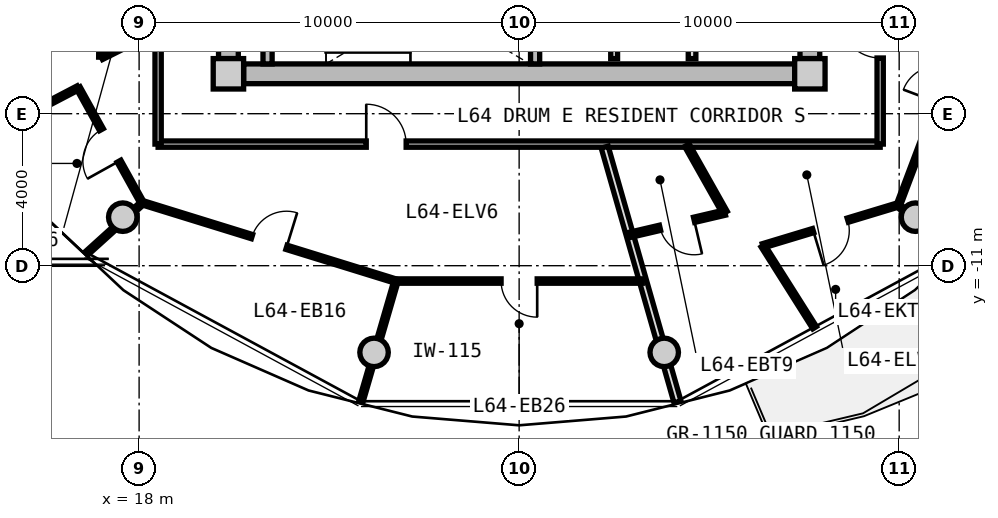
"""IFC4 building model, lengths in metres.
Left out: names, types, materials, properties, quantities, classifications, styles, units other than length and angle.
Written with IfcOpenShell. Run it as: python <this file> out.ifc"""

import sys

from ifc_helpers import new_model, si_unit, direction, frame, frame_2d, origin, origin_2d, place, context, subcontext, project, spatial, rectangle, circle, extrude, source, transform, mapped, element, fill, save


model = new_model("IFC4")
c1 = context("Model", 3, precision=1e-05, world=origin(), true_north=direction((0.0, 1.0)))
c2 = subcontext(c1, "Body", "Model", "MODEL_VIEW")
j1 = project(units=[si_unit("LENGTHUNIT", "METRE"), si_unit("PLANEANGLEUNIT", "RADIAN")], contexts=[c1])
p1 = place(None, origin())
s1 = spatial("IfcSite", under=j1, at=p1, CompositionType="ELEMENT")
p2 = place(p1, origin())
s2 = spatial("IfcBuilding", under=s1, at=p2, CompositionType="ELEMENT")
p3 = place(p2, frame((0.0, 0.0, 207.8)))
s3 = spatial("IfcBuildingStorey", under=s2, at=p3, CompositionType="ELEMENT", Elevation=207.8)
m1 = source(origin(), c2, "Body", "SweptSolid", [
    extrude(rectangle(XDim=0.8, YDim=0.8, at=origin_2d()), origin(), (0.0, 0.0, 1.0), 3.05),
])
for number, where, z_axis, x_axis in (
    (1, (20.35, -5.95, 0.0), (0.0, 0.0, 1.0), (1.0, 0.0, 0.0)),
    (2, (35.65, -5.95, 0.0), (0.0, 0.0, 1.0), (1.0, 0.0, 0.0)),
):
    element("IfcColumn", number, at=place(p3, frame(where, z_axis=z_axis, x_axis=x_axis)), inside=s3, PredefinedType="COLUMN", context=c2, shape_type="MappedRepresentation", body=[
        mapped(m1, transform((0.0, 0.0, 0.0), x_axis=(1.0, 0.0, 0.0), y_axis=(0.0, 1.0, 0.0), z_axis=(0.0, 0.0, 1.0), scale=1.0)),
    ])
m2 = source(origin(), c2, "Body", "SweptSolid", [
    extrude(rectangle(XDim=14.5, YDim=0.52, at=frame_2d((7.25, 0.0))), origin(), (0.0, 0.0, 1.0), 2.76),
])
p4 = place(p3, frame((35.25, -5.95, 0.0), z_axis=(0.0, 0.0, 1.0), x_axis=(-1.0, 0.0, 0.0)))
e3 = element("IfcWall", 3, at=p4, inside=s3, PredefinedType="SHEAR", context=c2, shape_type="MappedRepresentation", body=[
    mapped(m2, transform((0.0, 0.0, 0.0), x_axis=(1.0, 0.0, 0.0), y_axis=(0.0, 1.0, 0.0), z_axis=(0.0, 0.0, 1.0), scale=1.0)),
])
m3 = source(origin(), c2, "Body", "SweptSolid", [
    extrude(rectangle(XDim=11.1, YDim=0.52, at=frame_2d((5.55, 0.0))), origin(), (0.0, 0.0, 1.0), 2.76),
])
p5 = place(p3, frame((20.35, -5.55, 0.0), z_axis=(0.0, 0.0, 1.0), x_axis=(0.0, 1.0, 0.0)))
e4 = element("IfcWall", 4, at=p5, inside=s3, PredefinedType="SHEAR", context=c2, shape_type="MappedRepresentation", body=[
    mapped(m3, transform((0.0, 0.0, 0.0), x_axis=(1.0, 0.0, 0.0), y_axis=(0.0, 1.0, 0.0), z_axis=(0.0, 0.0, 1.0), scale=1.0)),
])
p6 = place(p5, frame((3.8, 0.0, 0.0)))
e5 = element("IfcOpeningElement", 5, at=p6, cuts=e4, PredefinedType="OPENING", context=c2, shape_type="SweptSolid", body=[
    extrude(rectangle(XDim=1.2, YDim=2.15, at=frame_2d((0.6, 1.075))), frame((0.0, 0.27, 0.0), z_axis=(0.0, -1.0, 0.0), x_axis=(1.0, 0.0, 0.0)), (0.0, 0.0, 1.0), 0.54),
])
p7 = place(p3, frame((35.65, 5.55, 0.0), z_axis=(0.0, 0.0, 1.0), x_axis=(0.0, -1.0, 0.0)))
e6 = element("IfcWall", 6, at=p7, inside=s3, PredefinedType="SHEAR", context=c2, shape_type="MappedRepresentation", body=[
    mapped(m3, transform((0.0, 0.0, 0.0), x_axis=(1.0, 0.0, 0.0), y_axis=(0.0, 1.0, 0.0), z_axis=(0.0, 0.0, 1.0), scale=1.0)),
])
p8 = place(p7, frame((5.65, 0.0, 0.0)))
e7 = element("IfcOpeningElement", 7, at=p8, cuts=e6, PredefinedType="OPENING", context=c2, shape_type="SweptSolid", body=[
    extrude(rectangle(XDim=1.2, YDim=2.15, at=frame_2d((0.6, 1.075))), frame((0.0, 0.27, 0.0), z_axis=(0.0, -1.0, 0.0), x_axis=(1.0, 0.0, 0.0)), (0.0, 0.0, 1.0), 0.54),
])
p9 = place(p7, frame((9.3, 0.0, 0.0)))
e8 = element("IfcOpeningElement", 8, at=p9, cuts=e6, PredefinedType="OPENING", context=c2, shape_type="SweptSolid", body=[
    extrude(rectangle(XDim=1.0, YDim=2.1, at=frame_2d((0.5, 1.05))), frame((0.0, 0.27, 0.0), z_axis=(0.0, -1.0, 0.0), x_axis=(1.0, 0.0, 0.0)), (0.0, 0.0, 1.0), 0.54),
])
m4 = source(origin(), c2, "Body", "SweptSolid", [
    extrude(circle(Radius=0.375, at=origin_2d()), origin(), (0.0, 0.0, 1.0), 3.05),
])
for number, where, z_axis, x_axis in (
    (9, (17.57, -9.723, 0.0), (0.0, 0.0, 1.0), (1.0, 0.0, 0.0)),
    (10, (24.182, -13.281, 0.0), (0.0, 0.0, 1.0), (1.0, 0.0, 0.0)),
    (11, (31.818, -13.281, 0.0), (0.0, 0.0, 1.0), (1.0, 0.0, 0.0)),
    (12, (38.43, -9.723, 0.0), (0.0, 0.0, 1.0), (1.0, 0.0, 0.0)),
):
    element("IfcColumn", number, at=place(p3, frame(where, z_axis=z_axis, x_axis=x_axis)), inside=s3, PredefinedType="COLUMN", context=c2, shape_type="MappedRepresentation", body=[
        mapped(m4, transform((0.0, 0.0, 0.0), x_axis=(1.0, 0.0, 0.0), y_axis=(0.0, 1.0, 0.0), z_axis=(0.0, 0.0, 1.0), scale=1.0)),
    ])
m5 = source(origin(), c2, "Body", "SweptSolid", [
    extrude(rectangle(XDim=3.24, YDim=0.24, at=frame_2d((1.62, 0.0))), origin(), (0.0, 0.0, 1.0), 2.76),
])
for number, where, z_axis, x_axis in (
    (13, (21.38, -5.69, 0.0), (0.0, 0.0, 1.0), (0.0, 1.0, 0.0)),
    (14, (28.42, -5.69, 0.0), (0.0, 0.0, 1.0), (0.0, 1.0, 0.0)),
):
    element("IfcWall", number, at=place(p3, frame(where, z_axis=z_axis, x_axis=x_axis)), inside=s3, PredefinedType="PARTITIONING", context=c2, shape_type="MappedRepresentation", body=[
        mapped(m5, transform((0.0, 0.0, 0.0), x_axis=(1.0, 0.0, 0.0), y_axis=(0.0, 1.0, 0.0), z_axis=(0.0, 0.0, 1.0), scale=1.0)),
    ])
m6 = source(origin(), c2, "Body", "SweptSolid", [
    extrude(rectangle(XDim=3.8, YDim=0.2, at=frame_2d((1.9, 0.0))), origin(), (0.0, 0.0, 1.0), 2.745),
])
p10 = place(p3, frame((32.55, -5.55, 0.0), z_axis=(0.0, 0.0, 1.0), x_axis=(0.0, 1.0, 0.0)))
e15 = element("IfcWall", 15, at=p10, inside=s3, PredefinedType="PARTITIONING", context=c2, shape_type="MappedRepresentation", body=[
    mapped(m6, transform((0.0, 0.0, 0.0), x_axis=(1.0, 0.0, 0.0), y_axis=(0.0, 1.0, 0.0), z_axis=(0.0, 0.0, 1.0), scale=1.0)),
])
m7 = source(origin(), c2, "Body", "SweptSolid", [
    extrude(rectangle(XDim=4.2, YDim=0.18, at=frame_2d((2.1, 0.0))), origin(), (0.0, 0.0, 1.0), 2.745),
])
p11 = place(p3, frame((30.5, -5.55, 0.0), z_axis=(0.0, 0.0, 1.0), x_axis=(0.0, 1.0, 0.0)))
e16 = element("IfcWall", 16, at=p11, inside=s3, PredefinedType="PARTITIONING", context=c2, shape_type="MappedRepresentation", body=[
    mapped(m7, transform((0.0, 0.0, 0.0), x_axis=(1.0, 0.0, 0.0), y_axis=(0.0, 1.0, 0.0), z_axis=(0.0, 0.0, 1.0), scale=1.0)),
])
m8 = source(origin(), c2, "Body", "SweptSolid", [
    extrude(rectangle(XDim=19.0, YDim=0.165, at=frame_2d((9.5, 0.0))), origin(), (0.0, 0.0, 1.0), 2.745),
])
p12 = place(p3, frame((37.5, -7.8, 0.0), z_axis=(0.0, 0.0, 1.0), x_axis=(-1.0, 0.0, 0.0)))
e17 = element("IfcWall", 17, at=p12, inside=s3, PredefinedType="PARTITIONING", context=c2, shape_type="MappedRepresentation", body=[
    mapped(m8, transform((0.0, 0.0, 0.0), x_axis=(1.0, 0.0, 0.0), y_axis=(0.0, 1.0, 0.0), z_axis=(0.0, 0.0, 1.0), scale=1.0)),
])
p13 = place(p12, frame((12.473, 0.0, 0.0)))
e18 = element("IfcOpeningElement", 18, at=p13, cuts=e17, PredefinedType="OPENING", context=c2, shape_type="SweptSolid", body=[
    extrude(rectangle(XDim=1.05, YDim=2.15, at=frame_2d((0.525, 1.075))), frame((0.0, 0.093, 0.0), z_axis=(0.0, -1.0, 0.0), x_axis=(1.0, 0.0, 0.0)), (0.0, 0.0, 1.0), 0.185),
])
m9 = source(origin(), c2, "Body", "SweptSolid", [
    extrude(rectangle(XDim=6.88, YDim=0.165, at=frame_2d((3.44, 0.0))), origin(), (0.0, 0.0, 1.0), 2.745),
])
p14 = place(p3, frame((18.5, -7.8, 0.0), z_axis=(0.0, 0.0, 1.0), x_axis=(0.0, 1.0, 0.0)))
e19 = element("IfcWall", 19, at=p14, inside=s3, PredefinedType="PARTITIONING", context=c2, shape_type="MappedRepresentation", body=[
    mapped(m9, transform((0.0, 0.0, 0.0), x_axis=(1.0, 0.0, 0.0), y_axis=(0.0, 1.0, 0.0), z_axis=(0.0, 0.0, 1.0), scale=1.0)),
])
p15 = place(p3, frame((37.5, -0.92, 0.0), z_axis=(0.0, 0.0, 1.0), x_axis=(0.0, -1.0, 0.0)))
e20 = element("IfcWall", 20, at=p15, inside=s3, PredefinedType="PARTITIONING", context=c2, shape_type="MappedRepresentation", body=[
    mapped(m9, transform((0.0, 0.0, 0.0), x_axis=(1.0, 0.0, 0.0), y_axis=(0.0, 1.0, 0.0), z_axis=(0.0, 0.0, 1.0), scale=1.0)),
])
p16 = place(p15, frame((3.564, 0.0, 0.0)))
e21 = element("IfcOpeningElement", 21, at=p16, cuts=e20, PredefinedType="OPENING", context=c2, shape_type="SweptSolid", body=[
    extrude(rectangle(XDim=1.05, YDim=2.15, at=frame_2d((0.525, 1.075))), frame((0.0, 0.093, 0.0), z_axis=(0.0, -1.0, 0.0), x_axis=(1.0, 0.0, 0.0)), (0.0, 0.0, 1.0), 0.185),
])
m10 = source(origin(), c2, "Body", "SweptSolid", [
    extrude(rectangle(XDim=6.974, YDim=0.19, at=frame_2d((3.487, 0.0))), origin(), (0.0, 0.0, 1.0), 2.345),
])
p17 = place(p3, frame((30.251, -7.88, 0.0), z_axis=(0.0, 0.0, 1.0), x_axis=(0.274707256801, -0.961527910703, 0.0)))
e22 = element("IfcWall", 22, at=p17, inside=s3, PredefinedType="PARTITIONING", context=c2, shape_type="MappedRepresentation", body=[
    mapped(m10, transform((0.0, 0.0, 0.0), x_axis=(1.0, 0.0, 0.0), y_axis=(0.0, 1.0, 0.0), z_axis=(0.0, 0.0, 1.0), scale=1.0)),
])
m11 = source(origin(), c2, "Body", "SweptSolid", [
    extrude(rectangle(XDim=6.98, YDim=0.115, at=frame_2d((3.49, 0.0))), origin(), (0.0, 0.0, 1.0), 2.745),
])
p18 = place(p3, frame((18.091, -9.344, 0.0), z_axis=(0.0, 0.0, 1.0), x_axis=(0.955342331637, -0.295501318749, 0.0)))
e23 = element("IfcWall", 23, at=p18, inside=s3, PredefinedType="PARTITIONING", context=c2, shape_type="MappedRepresentation", body=[
    mapped(m11, transform((0.0, 0.0, 0.0), x_axis=(1.0, 0.0, 0.0), y_axis=(0.0, 1.0, 0.0), z_axis=(0.0, 0.0, 1.0), scale=1.0)),
])
p19 = place(p18, frame((3.015, 0.0, 0.0)))
e24 = element("IfcOpeningElement", 24, at=p19, cuts=e23, PredefinedType="OPENING", context=c2, shape_type="SweptSolid", body=[
    extrude(rectangle(XDim=0.95, YDim=2.1, at=frame_2d((0.475, 1.05))), frame((0.0, 0.067, 0.0), z_axis=(0.0, -1.0, 0.0), x_axis=(1.0, 0.0, 0.0)), (0.0, 0.0, 1.0), 0.135),
])
m12 = source(origin(), c2, "Body", "SweptSolid", [
    extrude(rectangle(XDim=1.988, YDim=0.115, at=frame_2d((0.994, 0.0))), origin(), (0.0, 0.0, 1.0), 2.345),
])
p20 = place(p3, frame((18.091, -9.344, 0.0), z_axis=(0.0, 0.0, 1.0), x_axis=(-0.741992301729, -0.670408401033, 0.0)))
e25 = element("IfcWall", 25, at=p20, inside=s3, PredefinedType="PARTITIONING", context=c2, shape_type="MappedRepresentation", body=[
    mapped(m12, transform((0.0, 0.0, 0.0), x_axis=(1.0, 0.0, 0.0), y_axis=(0.0, 1.0, 0.0), z_axis=(0.0, 0.0, 1.0), scale=1.0)),
])
m13 = source(origin(), c2, "Body", "SweptSolid", [
    extrude(rectangle(XDim=6.481, YDim=0.115, at=frame_2d((3.24, 0.0))), origin(), (0.0, 0.0, 1.0), 2.745),
])
p21 = place(p3, frame((24.76, -11.404, 0.0), z_axis=(0.0, 0.0, 1.0), x_axis=(1.0, 0.0, 0.0)))
e26 = element("IfcWall", 26, at=p21, inside=s3, PredefinedType="PARTITIONING", context=c2, shape_type="MappedRepresentation", body=[
    mapped(m13, transform((0.0, 0.0, 0.0), x_axis=(1.0, 0.0, 0.0), y_axis=(0.0, 1.0, 0.0), z_axis=(0.0, 0.0, 1.0), scale=1.0)),
])
p22 = place(p21, frame((2.765, 0.0, 0.0)))
e27 = element("IfcOpeningElement", 27, at=p22, cuts=e26, PredefinedType="OPENING", context=c2, shape_type="SweptSolid", body=[
    extrude(rectangle(XDim=0.95, YDim=2.1, at=frame_2d((0.475, 1.05))), frame((0.0, 0.067, 0.0), z_axis=(0.0, -1.0, 0.0), x_axis=(1.0, 0.0, 0.0)), (0.0, 0.0, 1.0), 0.135),
])
m14 = source(origin(), c2, "Body", "SweptSolid", [
    extrude(rectangle(XDim=3.313, YDim=0.115, at=frame_2d((1.657, 0.0))), origin(), (0.0, 0.0, 1.0), 2.345),
])
p23 = place(p3, frame((24.76, -11.404, 0.0), z_axis=(0.0, 0.0, 1.0), x_axis=(-0.279612365916, -0.960112975033, 0.0)))
e28 = element("IfcWall", 28, at=p23, inside=s3, PredefinedType="PARTITIONING", context=c2, shape_type="MappedRepresentation", body=[
    mapped(m14, transform((0.0, 0.0, 0.0), x_axis=(1.0, 0.0, 0.0), y_axis=(0.0, 1.0, 0.0), z_axis=(0.0, 0.0, 1.0), scale=1.0)),
])
m15 = source(origin(), c2, "Body", "SweptSolid", [
    extrude(rectangle(XDim=1.638, YDim=0.14, at=frame_2d((0.819, 0.0))), origin(), (0.0, 0.0, 1.0), 2.745),
])
p24 = place(p3, frame((18.47, -4.778, 0.0), z_axis=(0.0, 0.0, 1.0), x_axis=(-0.893919977945, -0.448226586707, 0.0)))
e29 = element("IfcWall", 29, at=p24, inside=s3, PredefinedType="PARTITIONING", context=c2, shape_type="MappedRepresentation", body=[
    mapped(m15, transform((0.0, 0.0, 0.0), x_axis=(1.0, 0.0, 0.0), y_axis=(0.0, 1.0, 0.0), z_axis=(0.0, 0.0, 1.0), scale=1.0)),
])
m16 = source(origin(), c2, "Body", "SweptSolid", [
    extrude(rectangle(XDim=2.759, YDim=0.14, at=frame_2d((1.379, 0.0))), origin(), (0.0, 0.0, 1.0), 2.745),
])
p25 = place(p3, frame((17.005, -5.513, 0.0), z_axis=(0.0, 0.0, 1.0), x_axis=(0.01194710728, 0.999928630767, 0.0)))
e30 = element("IfcWall", 30, at=p25, inside=s3, PredefinedType="PARTITIONING", context=c2, shape_type="MappedRepresentation", body=[
    mapped(m16, transform((0.0, 0.0, 0.0), x_axis=(1.0, 0.0, 0.0), y_axis=(0.0, 1.0, 0.0), z_axis=(0.0, 0.0, 1.0), scale=1.0)),
])
p26 = place(p25, frame((0.919, 0.0, 0.0)))
e31 = element("IfcOpeningElement", 31, at=p26, cuts=e30, PredefinedType="OPENING", context=c2, shape_type="SweptSolid", body=[
    extrude(rectangle(XDim=0.92, YDim=2.1, at=frame_2d((0.46, 1.05))), frame((0.0, 0.08, 0.0), z_axis=(0.0, -1.0, 0.0), x_axis=(1.0, 0.0, 0.0)), (0.0, 0.0, 1.0), 0.16),
])
m17 = source(origin(), c2, "Body", "SweptSolid", [
    extrude(rectangle(XDim=2.104, YDim=0.115, at=frame_2d((1.052, 0.0))), origin(), (0.0, 0.0, 1.0), 2.745),
])
p27 = place(p3, frame((16.396, -6.317, 0.0), z_axis=(0.0, 0.0, 1.0), x_axis=(-0.886060817493, -0.463569010724, 0.0)))
e32 = element("IfcWall", 32, at=p27, inside=s3, PredefinedType="PARTITIONING", context=c2, shape_type="MappedRepresentation", body=[
    mapped(m17, transform((0.0, 0.0, 0.0), x_axis=(1.0, 0.0, 0.0), y_axis=(0.0, 1.0, 0.0), z_axis=(0.0, 0.0, 1.0), scale=1.0)),
])
m18 = source(origin(), c2, "Body", "SweptSolid", [
    extrude(rectangle(XDim=3.472, YDim=0.115, at=frame_2d((1.736, 0.0))), origin(), (0.0, 0.0, 1.0), 2.745),
])
p28 = place(p3, frame((16.396, -6.317, 0.0), z_axis=(0.0, 0.0, 1.0), x_axis=(0.485804139346, -0.874067696574, 0.0)))
e33 = element("IfcWall", 33, at=p28, inside=s3, PredefinedType="PARTITIONING", context=c2, shape_type="MappedRepresentation", body=[
    mapped(m18, transform((0.0, 0.0, 0.0), x_axis=(1.0, 0.0, 0.0), y_axis=(0.0, 1.0, 0.0), z_axis=(0.0, 0.0, 1.0), scale=1.0)),
])
p29 = place(p28, frame((1.261, 0.0, 0.0)))
e34 = element("IfcOpeningElement", 34, at=p29, cuts=e33, PredefinedType="OPENING", context=c2, shape_type="SweptSolid", body=[
    extrude(rectangle(XDim=0.95, YDim=2.1, at=frame_2d((0.475, 1.05))), frame((0.0, 0.067, 0.0), z_axis=(0.0, -1.0, 0.0), x_axis=(1.0, 0.0, 0.0)), (0.0, 0.0, 1.0), 0.135),
])
m19 = source(origin(), c2, "Body", "SweptSolid", [
    extrude(rectangle(XDim=6.738, YDim=0.115, at=frame_2d((3.369, 0.0))), origin(), (0.0, 0.0, 1.0), 2.745),
])
p30 = place(p3, frame((37.978, -9.409, 0.0), z_axis=(0.0, 0.0, 1.0), x_axis=(0.352945344347, 0.935643940772, 0.0)))
e35 = element("IfcWall", 35, at=p30, inside=s3, PredefinedType="PARTITIONING", context=c2, shape_type="MappedRepresentation", body=[
    mapped(m19, transform((0.0, 0.0, 0.0), x_axis=(1.0, 0.0, 0.0), y_axis=(0.0, 1.0, 0.0), z_axis=(0.0, 0.0, 1.0), scale=1.0)),
])
p31 = place(p30, frame((2.894, 0.0, 0.0)))
e36 = element("IfcOpeningElement", 36, at=p31, cuts=e35, PredefinedType="OPENING", context=c2, shape_type="SweptSolid", body=[
    extrude(rectangle(XDim=0.95, YDim=2.1, at=frame_2d((0.475, 1.05))), frame((0.0, 0.067, 0.0), z_axis=(0.0, -1.0, 0.0), x_axis=(1.0, 0.0, 0.0)), (0.0, 0.0, 1.0), 0.135),
])
m20 = source(origin(), c2, "Body", "SweptSolid", [
    extrude(rectangle(XDim=1.894, YDim=0.115, at=frame_2d((0.947, 0.0))), origin(), (0.0, 0.0, 1.0), 2.345),
])
p32 = place(p3, frame((37.978, -9.409, 0.0), z_axis=(0.0, 0.0, 1.0), x_axis=(0.742704207382, -0.669619638554, 0.0)))
e37 = element("IfcWall", 37, at=p32, inside=s3, PredefinedType="PARTITIONING", context=c2, shape_type="MappedRepresentation", body=[
    mapped(m20, transform((0.0, 0.0, 0.0), x_axis=(1.0, 0.0, 0.0), y_axis=(0.0, 1.0, 0.0), z_axis=(0.0, 0.0, 1.0), scale=1.0)),
])
m21 = source(origin(), c2, "Body", "SweptSolid", [
    extrude(rectangle(XDim=2.035, YDim=0.14, at=frame_2d((1.018, 0.0))), origin(), (0.0, 0.0, 1.0), 2.745),
])
p33 = place(p3, frame((32.415, -7.83, 0.0), z_axis=(0.0, 0.0, 1.0), x_axis=(0.491092509169, -0.871107425888, 0.0)))
e38 = element("IfcWall", 38, at=p33, inside=s3, PredefinedType="PARTITIONING", context=c2, shape_type="MappedRepresentation", body=[
    mapped(m21, transform((0.0, 0.0, 0.0), x_axis=(1.0, 0.0, 0.0), y_axis=(0.0, 1.0, 0.0), z_axis=(0.0, 0.0, 1.0), scale=1.0)),
])
m22 = source(origin(), c2, "Body", "SweptSolid", [
    extrude(rectangle(XDim=2.586, YDim=0.14, at=frame_2d((1.293, 0.0))), origin(), (0.0, 0.0, 1.0), 2.745),
])
p34 = place(p3, frame((33.415, -9.603, 0.0), z_axis=(0.0, 0.0, 1.0), x_axis=(-0.973691298219, -0.227871138526, 0.0)))
e39 = element("IfcWall", 39, at=p34, inside=s3, PredefinedType="PARTITIONING", context=c2, shape_type="MappedRepresentation", body=[
    mapped(m22, transform((0.0, 0.0, 0.0), x_axis=(1.0, 0.0, 0.0), y_axis=(0.0, 1.0, 0.0), z_axis=(0.0, 0.0, 1.0), scale=1.0)),
])
p35 = place(p34, frame((0.833, 0.0, 0.0)))
e40 = element("IfcOpeningElement", 40, at=p35, cuts=e39, PredefinedType="OPENING", context=c2, shape_type="SweptSolid", body=[
    extrude(rectangle(XDim=0.92, YDim=2.1, at=frame_2d((0.46, 1.05))), frame((0.0, 0.08, 0.0), z_axis=(0.0, -1.0, 0.0), x_axis=(1.0, 0.0, 0.0)), (0.0, 0.0, 1.0), 0.16),
])
m23 = source(origin(), c2, "Body", "SweptSolid", [
    extrude(rectangle(XDim=2.549, YDim=0.115, at=frame_2d((1.274, 0.0))), origin(), (0.0, 0.0, 1.0), 2.745),
])
p36 = place(p3, frame((34.414, -10.477, 0.0), z_axis=(0.0, 0.0, 1.0), x_axis=(0.534108310175, -0.845416059111, 0.0)))
e41 = element("IfcWall", 41, at=p36, inside=s3, PredefinedType="PARTITIONING", context=c2, shape_type="MappedRepresentation", body=[
    mapped(m23, transform((0.0, 0.0, 0.0), x_axis=(1.0, 0.0, 0.0), y_axis=(0.0, 1.0, 0.0), z_axis=(0.0, 0.0, 1.0), scale=1.0)),
])
m24 = source(origin(), c2, "Body", "SweptSolid", [
    extrude(rectangle(XDim=3.714, YDim=0.115, at=frame_2d((1.857, 0.0))), origin(), (0.0, 0.0, 1.0), 2.745),
])
p37 = place(p3, frame((34.414, -10.477, 0.0), z_axis=(0.0, 0.0, 1.0), x_axis=(0.957188983281, 0.28946372879, 0.0)))
e42 = element("IfcWall", 42, at=p37, inside=s3, PredefinedType="PARTITIONING", context=c2, shape_type="MappedRepresentation", body=[
    mapped(m24, transform((0.0, 0.0, 0.0), x_axis=(1.0, 0.0, 0.0), y_axis=(0.0, 1.0, 0.0), z_axis=(0.0, 0.0, 1.0), scale=1.0)),
])
p38 = place(p37, frame((1.382, 0.0, 0.0)))
e43 = element("IfcOpeningElement", 43, at=p38, cuts=e42, PredefinedType="OPENING", context=c2, shape_type="SweptSolid", body=[
    extrude(rectangle(XDim=0.95, YDim=2.1, at=frame_2d((0.475, 1.05))), frame((0.0, 0.067, 0.0), z_axis=(0.0, -1.0, 0.0), x_axis=(1.0, 0.0, 0.0)), (0.0, 0.0, 1.0), 0.135),
])
m25 = source(origin(), c2, "Body", "SweptSolid", [
    extrude(rectangle(XDim=1.05, YDim=2.15, at=frame_2d((0.525, 1.075))), frame((0.0, 0.025, 0.0), z_axis=(0.0, -1.0, 0.0), x_axis=(1.0, 0.0, 0.0)), (0.0, 0.0, 1.0), 0.05),
])
p39 = place(p13, frame((1.05, 0.0, 0.0), z_axis=(0.0, 0.0, 1.0), x_axis=(-1.0, 0.0, 0.0)))
e44 = element("IfcDoor", 44, at=p39, inside=s3, OperationType="SINGLE_SWING_LEFT", PredefinedType="DOOR", context=c2, shape_type="MappedRepresentation", body=[
    mapped(m25, transform((0.0, 0.0, 0.0), x_axis=(1.0, 0.0, 0.0), y_axis=(0.0, 1.0, 0.0), z_axis=(0.0, 0.0, 1.0), scale=1.0)),
])
fill(e18, e44)
m26 = source(origin(), c2, "Body", "SweptSolid", [
    extrude(rectangle(XDim=0.95, YDim=2.1, at=frame_2d((0.475, 1.05))), frame((0.0, 0.025, 0.0), z_axis=(0.0, -1.0, 0.0), x_axis=(1.0, 0.0, 0.0)), (0.0, 0.0, 1.0), 0.05),
])
p40 = place(p29, frame((0.95, 0.0, 0.0), z_axis=(0.0, 0.0, 1.0), x_axis=(-1.0, 0.0, 0.0)))
e45 = element("IfcDoor", 45, at=p40, inside=s3, OperationType="SINGLE_SWING_LEFT", PredefinedType="DOOR", context=c2, shape_type="MappedRepresentation", body=[
    mapped(m26, transform((0.0, 0.0, 0.0), x_axis=(1.0, 0.0, 0.0), y_axis=(0.0, 1.0, 0.0), z_axis=(0.0, 0.0, 1.0), scale=1.0)),
])
fill(e34, e45)
p41 = place(p19, origin())
e46 = element("IfcDoor", 46, at=p41, inside=s3, OperationType="SINGLE_SWING_RIGHT", PredefinedType="DOOR", context=c2, shape_type="MappedRepresentation", body=[
    mapped(m26, transform((0.0, 0.0, 0.0), x_axis=(1.0, 0.0, 0.0), y_axis=(0.0, 1.0, 0.0), z_axis=(0.0, 0.0, 1.0), scale=1.0)),
])
fill(e24, e46)
p42 = place(p22, frame((0.95, 0.0, 0.0), z_axis=(0.0, 0.0, 1.0), x_axis=(-1.0, 0.0, 0.0)))
e47 = element("IfcDoor", 47, at=p42, inside=s3, OperationType="SINGLE_SWING_LEFT", PredefinedType="DOOR", context=c2, shape_type="MappedRepresentation", body=[
    mapped(m26, transform((0.0, 0.0, 0.0), x_axis=(1.0, 0.0, 0.0), y_axis=(0.0, 1.0, 0.0), z_axis=(0.0, 0.0, 1.0), scale=1.0)),
])
fill(e27, e47)
p43 = place(p16, frame((1.05, 0.0, 0.0), z_axis=(0.0, 0.0, 1.0), x_axis=(-1.0, 0.0, 0.0)))
e48 = element("IfcDoor", 48, at=p43, inside=s3, OperationType="SINGLE_SWING_RIGHT", PredefinedType="DOOR", context=c2, shape_type="MappedRepresentation", body=[
    mapped(m25, transform((0.0, 0.0, 0.0), x_axis=(1.0, 0.0, 0.0), y_axis=(0.0, 1.0, 0.0), z_axis=(0.0, 0.0, 1.0), scale=1.0)),
])
fill(e21, e48)
m27 = source(origin(), c2, "Body", "SweptSolid", [
    extrude(rectangle(XDim=0.92, YDim=2.1, at=frame_2d((0.46, 1.05))), frame((0.0, 0.025, 0.0), z_axis=(0.0, -1.0, 0.0), x_axis=(1.0, 0.0, 0.0)), (0.0, 0.0, 1.0), 0.05),
])
p44 = place(p35, origin())
e49 = element("IfcDoor", 49, at=p44, inside=s3, OperationType="SINGLE_SWING_LEFT", PredefinedType="DOOR", context=c2, shape_type="MappedRepresentation", body=[
    mapped(m27, transform((0.0, 0.0, 0.0), x_axis=(1.0, 0.0, 0.0), y_axis=(0.0, 1.0, 0.0), z_axis=(0.0, 0.0, 1.0), scale=1.0)),
])
fill(e40, e49)
p45 = place(p38, frame((0.95, 0.0, 0.0), z_axis=(0.0, 0.0, 1.0), x_axis=(-1.0, 0.0, 0.0)))
e50 = element("IfcDoor", 50, at=p45, inside=s3, OperationType="SINGLE_SWING_RIGHT", PredefinedType="DOOR", context=c2, shape_type="MappedRepresentation", body=[
    mapped(m26, transform((0.0, 0.0, 0.0), x_axis=(1.0, 0.0, 0.0), y_axis=(0.0, 1.0, 0.0), z_axis=(0.0, 0.0, 1.0), scale=1.0)),
])
fill(e43, e50)
save(model, sys.argv[1])
